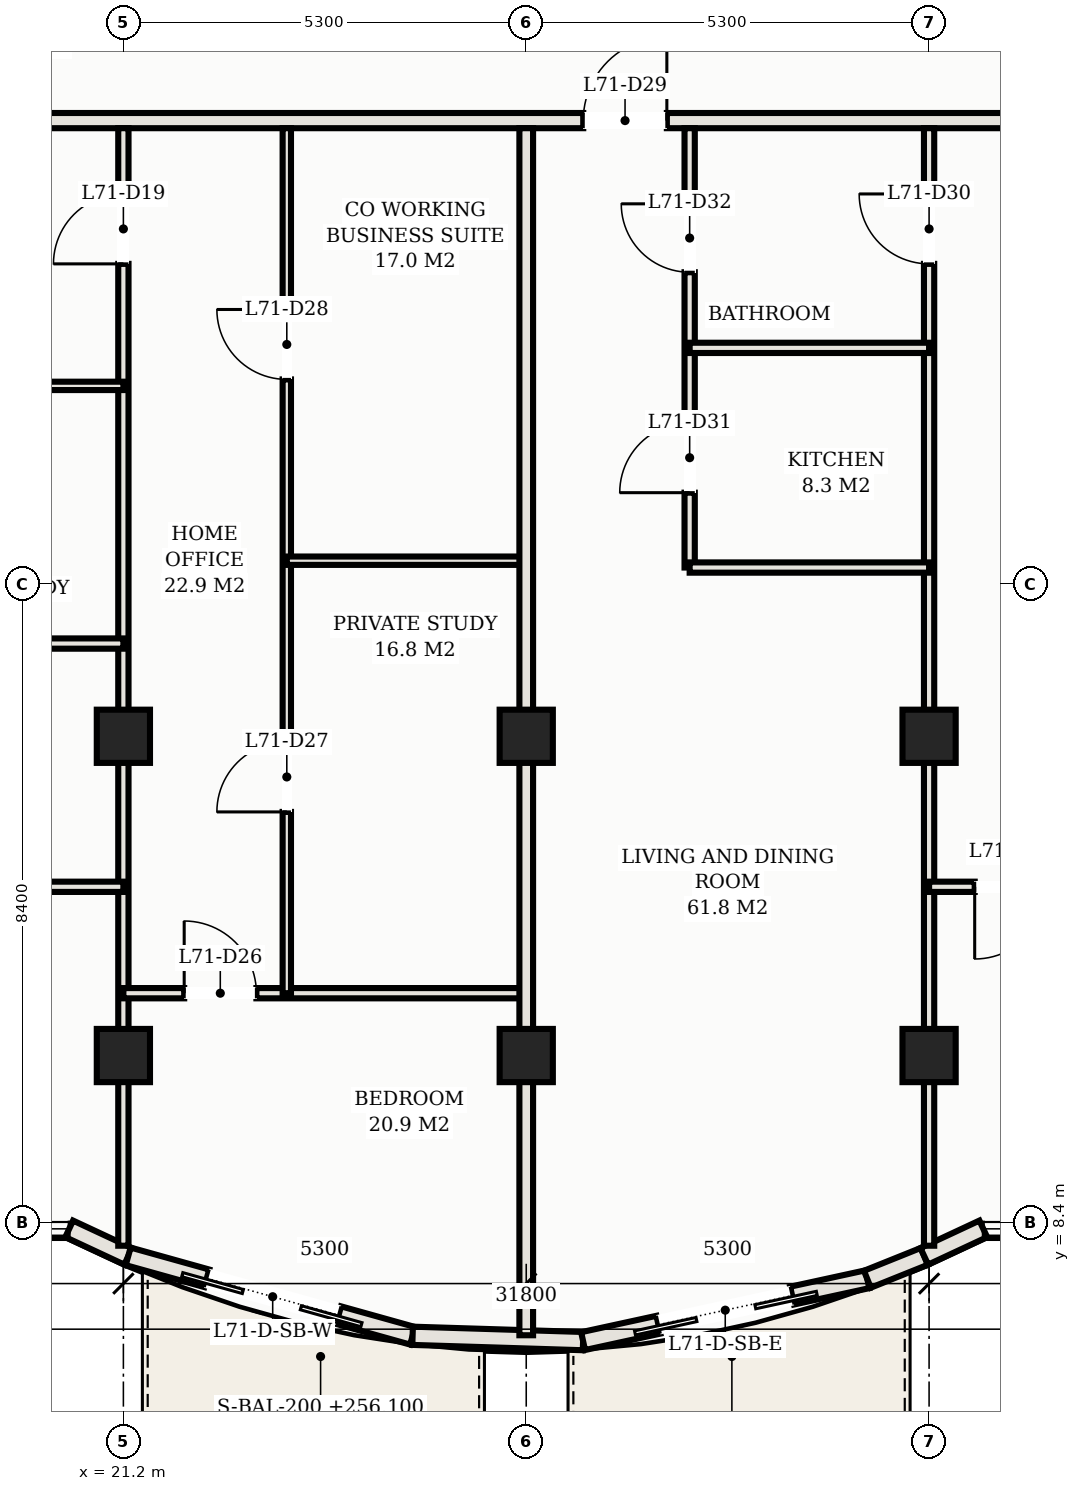
"""IFC4 building model, lengths in metres.
Left out: names, types, materials, properties, quantities, classifications, styles, units other than length and angle.
Written with IfcOpenShell. Run it as: python <this file> out.ifc"""

import sys

from ifc_helpers import new_model, si_unit, direction, frame, frame_2d, origin, origin_2d, place, context, subcontext, project, spatial, rectangle, hollow_rectangle, extrude, element, fill, save


model = new_model("IFC4")
c1 = context("Model", 3, precision=1e-05, world=origin(), true_north=direction((0.0, 1.0)))
c2 = subcontext(c1, "Body", "Model", "MODEL_VIEW")
j1 = project(units=[si_unit("LENGTHUNIT", "METRE"), si_unit("PLANEANGLEUNIT", "RADIAN")], contexts=[c1])
p1 = place(None, origin())
s1 = spatial("IfcSite", under=j1, at=p1, CompositionType="ELEMENT")
p2 = place(p1, origin())
s2 = spatial("IfcBuilding", under=s1, at=p2, CompositionType="ELEMENT")
p3 = place(p2, frame((0.0, 0.0, 256.1)))
s3 = spatial("IfcBuildingStorey", under=s2, at=p3, CompositionType="ELEMENT", Elevation=256.1)
for number, where, z_axis, x_axis in (
    (1, (21.2, 14.8, 0.0), (0.0, 0.0, 1.0), (1.0, 0.0, 0.0)),
    (2, (21.2, 10.6, 0.0), (0.0, 0.0, 1.0), (1.0, 0.0, 0.0)),
    (3, (26.5, 14.8, 0.0), (0.0, 0.0, 1.0), (1.0, 0.0, 0.0)),
    (4, (26.5, 10.6, 0.0), (0.0, 0.0, 1.0), (1.0, 0.0, 0.0)),
    (5, (31.8, 14.8, 0.0), (0.0, 0.0, 1.0), (1.0, 0.0, 0.0)),
    (6, (31.8, 10.6, 0.0), (0.0, 0.0, 1.0), (1.0, 0.0, 0.0)),
):
    element("IfcColumn", number, at=place(p3, frame(where, z_axis=z_axis, x_axis=x_axis)), inside=s3, PredefinedType="COLUMN", context=c2, shape_type="SweptSolid", body=[
        extrude(hollow_rectangle(XDim=0.7, YDim=0.7, WallThickness=0.025, at=origin_2d()), origin(), (0.0, 0.0, 1.0), 3.3),
    ])
p4 = place(p3, frame((20.487, 8.32, 0.0), z_axis=(0.0, 0.0, 1.0), x_axis=(0.906190424584, -0.422869855147, 0.0)))
e7 = element("IfcWall", 7, at=p4, inside=s3, PredefinedType="SOLIDWALL", context=c2, shape_type="SweptSolid", body=[
    extrude(rectangle(XDim=0.856, YDim=0.24, at=frame_2d((0.428, 0.0))), origin(), (0.0, 0.0, 1.0), 3.11),
])
p5 = place(p3, frame((21.263, 7.958, 0.0), z_axis=(0.0, 0.0, 1.0), x_axis=(0.963152398068, -0.268956238255, 0.0)))
e8 = element("IfcWall", 8, at=p5, inside=s3, PredefinedType="SOLIDWALL", context=c2, shape_type="SweptSolid", body=[
    extrude(rectangle(XDim=3.885, YDim=0.24, at=frame_2d((1.942, 0.0))), origin(), (0.0, 0.0, 1.0), 3.11),
])
p6 = place(p5, frame((1.074, 0.0, 0.0)))
e9 = element("IfcOpeningElement", 9, at=p6, cuts=e8, PredefinedType="OPENING", context=c2, shape_type="SweptSolid", body=[
    extrude(rectangle(XDim=1.8, YDim=2.2, at=frame_2d((0.9, 1.1))), frame((0.0, 0.13, 0.0), z_axis=(0.0, -1.0, 0.0), x_axis=(1.0, 0.0, 0.0)), (0.0, 0.0, 1.0), 0.26),
])
p7 = place(p3, frame((25.005, 6.913, 0.0), z_axis=(0.0, 0.0, 1.0), x_axis=(0.99951250052, -0.031221167572, 0.0)))
e10 = element("IfcWall", 10, at=p7, inside=s3, PredefinedType="SOLIDWALL", context=c2, shape_type="SweptSolid", body=[
    extrude(rectangle(XDim=2.244, YDim=0.24, at=frame_2d((1.122, 0.0))), origin(), (0.0, 0.0, 1.0), 3.11),
])
p8 = place(p3, frame((27.248, 6.843, 0.0), z_axis=(0.0, 0.0, 1.0), x_axis=(0.977126252677, 0.212660025225, 0.0)))
e11 = element("IfcWall", 11, at=p8, inside=s3, PredefinedType="SOLIDWALL", context=c2, shape_type="SweptSolid", body=[
    extrude(rectangle(XDim=3.828, YDim=0.24, at=frame_2d((1.914, 0.0))), origin(), (0.0, 0.0, 1.0), 3.11),
])
p9 = place(p8, frame((1.014, 0.0, 0.0)))
e12 = element("IfcOpeningElement", 12, at=p9, cuts=e11, PredefinedType="OPENING", context=c2, shape_type="SweptSolid", body=[
    extrude(rectangle(XDim=1.8, YDim=2.2, at=frame_2d((0.9, 1.1))), frame((0.0, 0.13, 0.0), z_axis=(0.0, -1.0, 0.0), x_axis=(1.0, 0.0, 0.0)), (0.0, 0.0, 1.0), 0.26),
])
p10 = place(p3, frame((30.988, 7.657, 0.0), z_axis=(0.0, 0.0, 1.0), x_axis=(0.927870589467, 0.372902358805, 0.0)))
e13 = element("IfcWall", 13, at=p10, inside=s3, PredefinedType="SOLIDWALL", context=c2, shape_type="SweptSolid", body=[
    extrude(rectangle(XDim=0.807, YDim=0.24, at=frame_2d((0.404, 0.0))), origin(), (0.0, 0.0, 1.0), 3.11),
])
p11 = place(p3, frame((31.737, 7.958, 0.0), z_axis=(0.0, 0.0, 1.0), x_axis=(0.906190424584, 0.422869855147, 0.0)))
e14 = element("IfcWall", 14, at=p11, inside=s3, PredefinedType="SOLIDWALL", context=c2, shape_type="SweptSolid", body=[
    extrude(rectangle(XDim=0.856, YDim=0.24, at=frame_2d((0.428, 0.0))), origin(), (0.0, 0.0, 1.0), 3.11),
])
p12 = place(p3, frame((8.6, 22.9, 0.0), z_axis=(0.0, 0.0, 1.0), x_axis=(1.0, 0.0, 0.0)))
e15 = element("IfcWall", 15, at=p12, inside=s3, PredefinedType="PARTITIONING", context=c2, shape_type="SweptSolid", body=[
    extrude(rectangle(XDim=35.8, YDim=0.2, at=frame_2d((17.9, 0.0))), origin(), (0.0, 0.0, 1.0), 2.45),
])
p13 = place(p12, frame((2.625, 0.0, 0.0)))
e16 = element("IfcOpeningElement", 16, at=p13, cuts=e15, PredefinedType="OPENING", context=c2, shape_type="SweptSolid", body=[
    extrude(rectangle(XDim=1.35, YDim=2.33, at=frame_2d((0.675, 1.165))), frame((0.0, 0.11, 0.0), z_axis=(0.0, -1.0, 0.0), x_axis=(1.0, 0.0, 0.0)), (0.0, 0.0, 1.0), 0.22),
])
p14 = place(p12, frame((18.65, 0.0, 0.0)))
e17 = element("IfcOpeningElement", 17, at=p14, cuts=e15, PredefinedType="OPENING", context=c2, shape_type="SweptSolid", body=[
    extrude(rectangle(XDim=1.1, YDim=2.25, at=frame_2d((0.55, 1.125))), frame((0.0, 0.11, 0.0), z_axis=(0.0, -1.0, 0.0), x_axis=(1.0, 0.0, 0.0)), (0.0, 0.0, 1.0), 0.22),
])
p15 = place(p12, frame((29.25, 0.0, 0.0)))
e18 = element("IfcOpeningElement", 18, at=p15, cuts=e15, PredefinedType="OPENING", context=c2, shape_type="SweptSolid", body=[
    extrude(rectangle(XDim=1.1, YDim=2.25, at=frame_2d((0.55, 1.125))), frame((0.0, 0.11, 0.0), z_axis=(0.0, -1.0, 0.0), x_axis=(1.0, 0.0, 0.0)), (0.0, 0.0, 1.0), 0.22),
])
p16 = place(p12, frame((0.505, 0.0, 0.0)))
e19 = element("IfcOpeningElement", 19, at=p16, cuts=e15, PredefinedType="OPENING", context=c2, shape_type="SweptSolid", body=[
    extrude(rectangle(XDim=0.9, YDim=2.15, at=frame_2d((0.45, 1.075))), frame((0.0, 0.11, 0.0), z_axis=(0.0, -1.0, 0.0), x_axis=(1.0, 0.0, 0.0)), (0.0, 0.0, 1.0), 0.22),
])
p17 = place(p12, frame((34.395, 0.0, 0.0)))
e20 = element("IfcOpeningElement", 20, at=p17, cuts=e15, PredefinedType="OPENING", context=c2, shape_type="SweptSolid", body=[
    extrude(rectangle(XDim=0.9, YDim=2.15, at=frame_2d((0.45, 1.075))), frame((0.0, 0.11, 0.0), z_axis=(0.0, -1.0, 0.0), x_axis=(1.0, 0.0, 0.0)), (0.0, 0.0, 1.0), 0.22),
])
p18 = place(p3, frame((21.2, 8.098, 0.0), z_axis=(0.0, 0.0, 1.0), x_axis=(0.0, 1.0, 0.0)))
e21 = element("IfcWall", 21, at=p18, inside=s3, PredefinedType="PARTITIONING", context=c2, shape_type="SweptSolid", body=[
    extrude(rectangle(XDim=14.702, YDim=0.135, at=frame_2d((7.351, 0.0))), origin(), (0.0, 0.0, 1.0), 2.45),
])
p19 = place(p18, frame((12.917, 0.0, 0.0)))
e22 = element("IfcOpeningElement", 22, at=p19, cuts=e21, PredefinedType="OPENING", context=c2, shape_type="SweptSolid", body=[
    extrude(rectangle(XDim=0.92, YDim=2.15, at=frame_2d((0.46, 1.075))), frame((0.0, 0.078, 0.0), z_axis=(0.0, -1.0, 0.0), x_axis=(1.0, 0.0, 0.0)), (0.0, 0.0, 1.0), 0.155),
])
p20 = place(p3, frame((15.9, 12.82, 0.0), z_axis=(0.0, 0.0, 1.0), x_axis=(1.0, 0.0, 0.0)))
e23 = element("IfcWall", 23, at=p20, inside=s3, PredefinedType="PARTITIONING", context=c2, shape_type="SweptSolid", body=[
    extrude(rectangle(XDim=5.3, YDim=0.135, at=frame_2d((2.65, 0.0))), origin(), (0.0, 0.0, 1.0), 2.45),
])
p21 = place(p20, frame((0.6, 0.0, 0.0)))
e24 = element("IfcOpeningElement", 24, at=p21, cuts=e23, PredefinedType="OPENING", context=c2, shape_type="SweptSolid", body=[
    extrude(rectangle(XDim=0.95, YDim=2.15, at=frame_2d((0.475, 1.075))), frame((0.0, 0.078, 0.0), z_axis=(0.0, -1.0, 0.0), x_axis=(1.0, 0.0, 0.0)), (0.0, 0.0, 1.0), 0.155),
])
p22 = place(p20, frame((3.275, 0.0, 0.0)))
e25 = element("IfcOpeningElement", 25, at=p22, cuts=e23, PredefinedType="OPENING", context=c2, shape_type="SweptSolid", body=[
    extrude(rectangle(XDim=0.9, YDim=2.15, at=frame_2d((0.45, 1.075))), frame((0.0, 0.078, 0.0), z_axis=(0.0, -1.0, 0.0), x_axis=(1.0, 0.0, 0.0)), (0.0, 0.0, 1.0), 0.155),
])
p23 = place(p3, frame((18.05, 16.02, 0.0), z_axis=(0.0, 0.0, 1.0), x_axis=(1.0, 0.0, 0.0)))
e26 = element("IfcWall", 26, at=p23, inside=s3, PredefinedType="PARTITIONING", context=c2, shape_type="SweptSolid", body=[
    extrude(rectangle(XDim=3.15, YDim=0.135, at=frame_2d((1.575, 0.0))), origin(), (0.0, 0.0, 1.0), 2.45),
])
p24 = place(p3, frame((18.05, 19.41, 0.0), z_axis=(0.0, 0.0, 1.0), x_axis=(1.0, 0.0, 0.0)))
e27 = element("IfcWall", 27, at=p24, inside=s3, PredefinedType="MOVABLE", context=c2, shape_type="SweptSolid", body=[
    extrude(rectangle(XDim=3.15, YDim=0.11, at=frame_2d((1.575, 0.0))), origin(), (0.0, 0.0, 1.0), 2.45),
])
p25 = place(p24, frame((1.115, 0.0, 0.0)))
e28 = element("IfcOpeningElement", 28, at=p25, cuts=e27, PredefinedType="OPENING", context=c2, shape_type="SweptSolid", body=[
    extrude(rectangle(XDim=0.92, YDim=2.15, at=frame_2d((0.46, 1.075))), frame((0.0, 0.065, 0.0), z_axis=(0.0, -1.0, 0.0), x_axis=(1.0, 0.0, 0.0)), (0.0, 0.0, 1.0), 0.13),
])
p26 = place(p3, frame((21.2, 11.42, 0.0), z_axis=(0.0, 0.0, 1.0), x_axis=(1.0, 0.0, 0.0)))
e29 = element("IfcWall", 29, at=p26, inside=s3, PredefinedType="PARTITIONING", context=c2, shape_type="SweptSolid", body=[
    extrude(rectangle(XDim=5.3, YDim=0.135, at=frame_2d((2.65, 0.0))), origin(), (0.0, 0.0, 1.0), 2.45),
])
p27 = place(p26, frame((0.8, 0.0, 0.0)))
e30 = element("IfcOpeningElement", 30, at=p27, cuts=e29, PredefinedType="OPENING", context=c2, shape_type="SweptSolid", body=[
    extrude(rectangle(XDim=0.95, YDim=2.15, at=frame_2d((0.475, 1.075))), frame((0.0, 0.078, 0.0), z_axis=(0.0, -1.0, 0.0), x_axis=(1.0, 0.0, 0.0)), (0.0, 0.0, 1.0), 0.155),
])
p28 = place(p3, frame((23.35, 11.42, 0.0), z_axis=(0.0, 0.0, 1.0), x_axis=(0.0, 1.0, 0.0)))
e31 = element("IfcWall", 31, at=p28, inside=s3, PredefinedType="MOVABLE", context=c2, shape_type="SweptSolid", body=[
    extrude(rectangle(XDim=11.38, YDim=0.11, at=frame_2d((5.69, 0.0))), origin(), (0.0, 0.0, 1.0), 2.45),
])
p29 = place(p28, frame((2.385, 0.0, 0.0)))
e32 = element("IfcOpeningElement", 32, at=p29, cuts=e31, PredefinedType="OPENING", context=c2, shape_type="SweptSolid", body=[
    extrude(rectangle(XDim=0.92, YDim=2.15, at=frame_2d((0.46, 1.075))), frame((0.0, 0.065, 0.0), z_axis=(0.0, -1.0, 0.0), x_axis=(1.0, 0.0, 0.0)), (0.0, 0.0, 1.0), 0.13),
])
p30 = place(p28, frame((8.075, 0.0, 0.0)))
e33 = element("IfcOpeningElement", 33, at=p30, cuts=e31, PredefinedType="OPENING", context=c2, shape_type="SweptSolid", body=[
    extrude(rectangle(XDim=0.92, YDim=2.15, at=frame_2d((0.46, 1.075))), frame((0.0, 0.065, 0.0), z_axis=(0.0, -1.0, 0.0), x_axis=(1.0, 0.0, 0.0)), (0.0, 0.0, 1.0), 0.13),
])
p31 = place(p3, frame((23.35, 17.11, 0.0), z_axis=(0.0, 0.0, 1.0), x_axis=(1.0, 0.0, 0.0)))
e34 = element("IfcWall", 34, at=p31, inside=s3, PredefinedType="MOVABLE", context=c2, shape_type="SweptSolid", body=[
    extrude(rectangle(XDim=3.15, YDim=0.11, at=frame_2d((1.575, 0.0))), origin(), (0.0, 0.0, 1.0), 2.45),
])
p32 = place(p3, frame((26.5, 6.92, 0.0), z_axis=(0.0, 0.0, 1.0), x_axis=(0.0, 1.0, 0.0)))
e35 = element("IfcWall", 35, at=p32, inside=s3, PredefinedType="PARTITIONING", context=c2, shape_type="SweptSolid", body=[
    extrude(rectangle(XDim=15.88, YDim=0.18, at=frame_2d((7.94, 0.0))), origin(), (0.0, 0.0, 1.0), 2.45),
])
p33 = place(p3, frame((31.8, 8.098, 0.0), z_axis=(0.0, 0.0, 1.0), x_axis=(0.0, 1.0, 0.0)))
e36 = element("IfcWall", 36, at=p33, inside=s3, PredefinedType="PARTITIONING", context=c2, shape_type="SweptSolid", body=[
    extrude(rectangle(XDim=14.702, YDim=0.135, at=frame_2d((7.351, 0.0))), origin(), (0.0, 0.0, 1.0), 2.45),
])
p34 = place(p33, frame((12.917, 0.0, 0.0)))
e37 = element("IfcOpeningElement", 37, at=p34, cuts=e36, PredefinedType="OPENING", context=c2, shape_type="SweptSolid", body=[
    extrude(rectangle(XDim=0.92, YDim=2.15, at=frame_2d((0.46, 1.075))), frame((0.0, 0.078, 0.0), z_axis=(0.0, -1.0, 0.0), x_axis=(1.0, 0.0, 0.0)), (0.0, 0.0, 1.0), 0.155),
])
p35 = place(p3, frame((28.65, 17.02, 0.0), z_axis=(0.0, 0.0, 1.0), x_axis=(0.0, 1.0, 0.0)))
e38 = element("IfcWall", 38, at=p35, inside=s3, PredefinedType="PARTITIONING", context=c2, shape_type="SweptSolid", body=[
    extrude(rectangle(XDim=5.78, YDim=0.135, at=frame_2d((2.89, 0.0))), origin(), (0.0, 0.0, 1.0), 2.45),
])
p36 = place(p35, frame((0.985, 0.0, 0.0)))
e39 = element("IfcOpeningElement", 39, at=p36, cuts=e38, PredefinedType="OPENING", context=c2, shape_type="SweptSolid", body=[
    extrude(rectangle(XDim=0.92, YDim=2.15, at=frame_2d((0.46, 1.075))), frame((0.0, 0.078, 0.0), z_axis=(0.0, -1.0, 0.0), x_axis=(1.0, 0.0, 0.0)), (0.0, 0.0, 1.0), 0.155),
])
p37 = place(p35, frame((3.885, 0.0, 0.0)))
e40 = element("IfcOpeningElement", 40, at=p37, cuts=e38, PredefinedType="OPENING", context=c2, shape_type="SweptSolid", body=[
    extrude(rectangle(XDim=0.9, YDim=2.15, at=frame_2d((0.45, 1.075))), frame((0.0, 0.078, 0.0), z_axis=(0.0, -1.0, 0.0), x_axis=(1.0, 0.0, 0.0)), (0.0, 0.0, 1.0), 0.155),
])
for number, where, z_axis, x_axis in (
    (41, (28.65, 17.02, 0.0), (0.0, 0.0, 1.0), (1.0, 0.0, 0.0)),
    (42, (28.65, 19.91, 0.0), (0.0, 0.0, 1.0), (1.0, 0.0, 0.0)),
):
    element("IfcWall", number, at=place(p3, frame(where, z_axis=z_axis, x_axis=x_axis)), inside=s3, PredefinedType="PARTITIONING", context=c2, shape_type="SweptSolid", body=[
        extrude(rectangle(XDim=3.15, YDim=0.135, at=frame_2d((1.575, 0.0))), origin(), (0.0, 0.0, 1.0), 2.45),
    ])
p38 = place(p3, frame((31.8, 12.82, 0.0), z_axis=(0.0, 0.0, 1.0), x_axis=(1.0, 0.0, 0.0)))
e43 = element("IfcWall", 43, at=p38, inside=s3, PredefinedType="PARTITIONING", context=c2, shape_type="SweptSolid", body=[
    extrude(rectangle(XDim=5.3, YDim=0.135, at=frame_2d((2.65, 0.0))), origin(), (0.0, 0.0, 1.0), 2.45),
])
p39 = place(p38, frame((0.6, 0.0, 0.0)))
e44 = element("IfcOpeningElement", 44, at=p39, cuts=e43, PredefinedType="OPENING", context=c2, shape_type="SweptSolid", body=[
    extrude(rectangle(XDim=0.95, YDim=2.15, at=frame_2d((0.475, 1.075))), frame((0.0, 0.078, 0.0), z_axis=(0.0, -1.0, 0.0), x_axis=(1.0, 0.0, 0.0)), (0.0, 0.0, 1.0), 0.155),
])
p40 = place(p38, frame((3.275, 0.0, 0.0)))
e45 = element("IfcOpeningElement", 45, at=p40, cuts=e43, PredefinedType="OPENING", context=c2, shape_type="SweptSolid", body=[
    extrude(rectangle(XDim=0.9, YDim=2.15, at=frame_2d((0.45, 1.075))), frame((0.0, 0.078, 0.0), z_axis=(0.0, -1.0, 0.0), x_axis=(1.0, 0.0, 0.0)), (0.0, 0.0, 1.0), 0.155),
])
p41 = place(p6, frame((1.8, 0.0, 0.0), z_axis=(0.0, 0.0, 1.0), x_axis=(-1.0, 0.0, 0.0)))
e46 = element("IfcDoor", 46, at=p41, inside=s3, OperationType="DOUBLE_DOOR_SLIDING", PredefinedType="DOOR", context=c2, shape_type="SweptSolid", body=[
    extrude(rectangle(XDim=1.8, YDim=2.2, at=frame_2d((0.9, 1.1))), frame((0.0, 0.025, 0.0), z_axis=(0.0, -1.0, 0.0), x_axis=(1.0, 0.0, 0.0)), (0.0, 0.0, 1.0), 0.05),
])
fill(e9, e46)
p42 = place(p9, frame((1.8, 0.0, 0.0), z_axis=(0.0, 0.0, 1.0), x_axis=(-1.0, 0.0, 0.0)))
e47 = element("IfcDoor", 47, at=p42, inside=s3, OperationType="DOUBLE_DOOR_SLIDING", PredefinedType="DOOR", context=c2, shape_type="SweptSolid", body=[
    extrude(rectangle(XDim=1.8, YDim=2.2, at=frame_2d((0.9, 1.1))), frame((0.0, 0.025, 0.0), z_axis=(0.0, -1.0, 0.0), x_axis=(1.0, 0.0, 0.0)), (0.0, 0.0, 1.0), 0.05),
])
fill(e12, e47)
p43 = place(p19, origin())
e48 = element("IfcDoor", 48, at=p43, inside=s3, OperationType="SINGLE_SWING_LEFT", PredefinedType="DOOR", context=c2, shape_type="SweptSolid", body=[
    extrude(rectangle(XDim=0.92, YDim=2.15, at=frame_2d((0.46, 1.075))), frame((0.0, 0.025, 0.0), z_axis=(0.0, -1.0, 0.0), x_axis=(1.0, 0.0, 0.0)), (0.0, 0.0, 1.0), 0.05),
])
fill(e22, e48)
p44 = place(p27, origin())
e49 = element("IfcDoor", 49, at=p44, inside=s3, OperationType="SINGLE_SWING_LEFT", PredefinedType="DOOR", context=c2, shape_type="SweptSolid", body=[
    extrude(rectangle(XDim=0.95, YDim=2.15, at=frame_2d((0.475, 1.075))), frame((0.0, 0.025, 0.0), z_axis=(0.0, -1.0, 0.0), x_axis=(1.0, 0.0, 0.0)), (0.0, 0.0, 1.0), 0.05),
])
fill(e30, e49)
p45 = place(p29, origin())
e50 = element("IfcDoor", 50, at=p45, inside=s3, OperationType="SINGLE_SWING_LEFT", PredefinedType="DOOR", context=c2, shape_type="SweptSolid", body=[
    extrude(rectangle(XDim=0.92, YDim=2.15, at=frame_2d((0.46, 1.075))), frame((0.0, 0.025, 0.0), z_axis=(0.0, -1.0, 0.0), x_axis=(1.0, 0.0, 0.0)), (0.0, 0.0, 1.0), 0.05),
])
fill(e32, e50)
p46 = place(p30, origin())
e51 = element("IfcDoor", 51, at=p46, inside=s3, OperationType="SINGLE_SWING_RIGHT", PredefinedType="DOOR", context=c2, shape_type="SweptSolid", body=[
    extrude(rectangle(XDim=0.92, YDim=2.15, at=frame_2d((0.46, 1.075))), frame((0.0, 0.025, 0.0), z_axis=(0.0, -1.0, 0.0), x_axis=(1.0, 0.0, 0.0)), (0.0, 0.0, 1.0), 0.05),
])
fill(e33, e51)
p47 = place(p14, origin())
e52 = element("IfcDoor", 52, at=p47, inside=s3, OperationType="SINGLE_SWING_RIGHT", PredefinedType="DOOR", context=c2, shape_type="SweptSolid", body=[
    extrude(rectangle(XDim=1.1, YDim=2.25, at=frame_2d((0.55, 1.125))), frame((0.0, 0.025, 0.0), z_axis=(0.0, -1.0, 0.0), x_axis=(1.0, 0.0, 0.0)), (0.0, 0.0, 1.0), 0.05),
])
fill(e17, e52)
p48 = place(p34, origin())
e53 = element("IfcDoor", 53, at=p48, inside=s3, OperationType="SINGLE_SWING_RIGHT", PredefinedType="DOOR", context=c2, shape_type="SweptSolid", body=[
    extrude(rectangle(XDim=0.92, YDim=2.15, at=frame_2d((0.46, 1.075))), frame((0.0, 0.025, 0.0), z_axis=(0.0, -1.0, 0.0), x_axis=(1.0, 0.0, 0.0)), (0.0, 0.0, 1.0), 0.05),
])
fill(e37, e53)
p49 = place(p36, origin())
e54 = element("IfcDoor", 54, at=p49, inside=s3, OperationType="SINGLE_SWING_LEFT", PredefinedType="DOOR", context=c2, shape_type="SweptSolid", body=[
    extrude(rectangle(XDim=0.92, YDim=2.15, at=frame_2d((0.46, 1.075))), frame((0.0, 0.025, 0.0), z_axis=(0.0, -1.0, 0.0), x_axis=(1.0, 0.0, 0.0)), (0.0, 0.0, 1.0), 0.05),
])
fill(e39, e54)
p50 = place(p37, origin())
e55 = element("IfcDoor", 55, at=p50, inside=s3, OperationType="SINGLE_SWING_RIGHT", PredefinedType="DOOR", context=c2, shape_type="SweptSolid", body=[
    extrude(rectangle(XDim=0.9, YDim=2.15, at=frame_2d((0.45, 1.075))), frame((0.0, 0.025, 0.0), z_axis=(0.0, -1.0, 0.0), x_axis=(1.0, 0.0, 0.0)), (0.0, 0.0, 1.0), 0.05),
])
fill(e40, e55)
p51 = place(p39, frame((0.95, 0.0, 0.0), z_axis=(0.0, 0.0, 1.0), x_axis=(-1.0, 0.0, 0.0)))
e56 = element("IfcDoor", 56, at=p51, inside=s3, OperationType="SINGLE_SWING_RIGHT", PredefinedType="DOOR", context=c2, shape_type="SweptSolid", body=[
    extrude(rectangle(XDim=0.95, YDim=2.15, at=frame_2d((0.475, 1.075))), frame((0.0, 0.025, 0.0), z_axis=(0.0, -1.0, 0.0), x_axis=(1.0, 0.0, 0.0)), (0.0, 0.0, 1.0), 0.05),
])
fill(e44, e56)
save(model, sys.argv[1])
